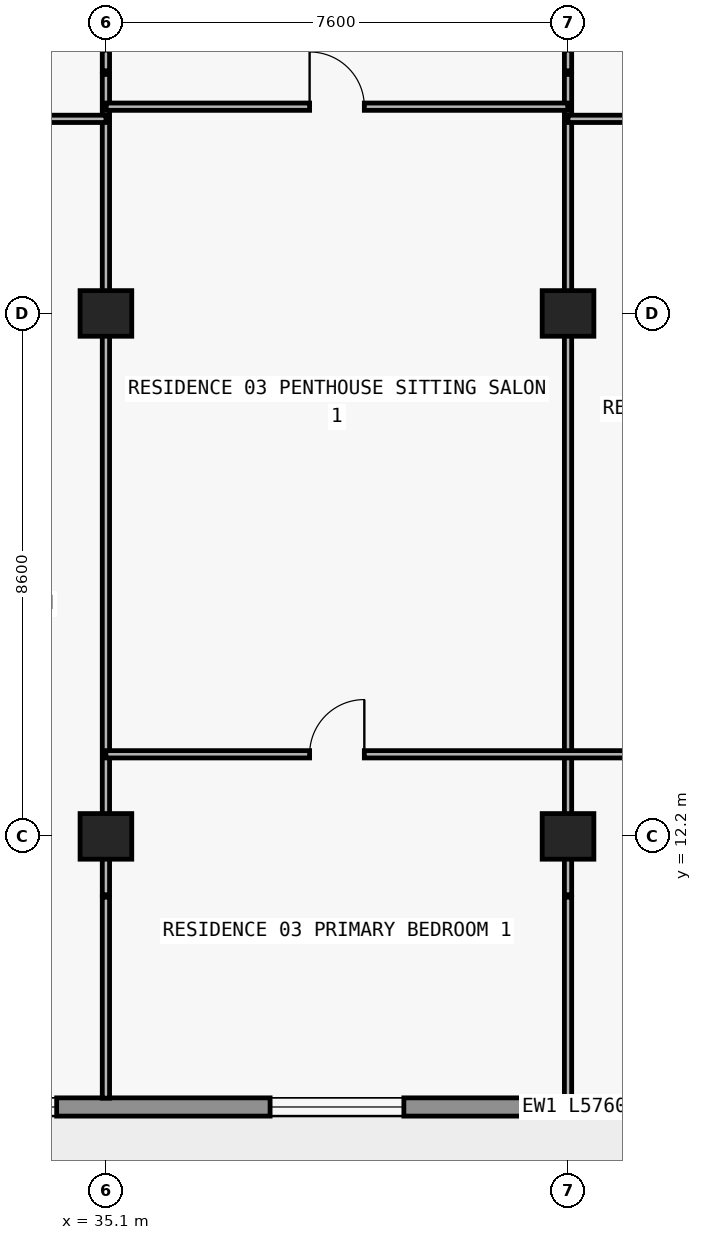
"""IFC4 building model, lengths in metres.
Left out: names, types, materials, properties, quantities, classifications, styles, units other than length and angle.
Written with IfcOpenShell. Run it as: python <this file> out.ifc"""

import sys

from ifc_helpers import new_model, si_unit, direction, frame, frame_2d, origin, origin_2d, place, context, subcontext, project, spatial, rectangle, extrude, element, fill, save


model = new_model("IFC4")
c1 = context("Model", 3, precision=1e-05, world=origin(), true_north=direction((0.0, 1.0)))
c2 = subcontext(c1, "Body", "Model", "MODEL_VIEW")
j1 = project(units=[si_unit("LENGTHUNIT", "METRE"), si_unit("PLANEANGLEUNIT", "RADIAN")], contexts=[c1])
p1 = place(None, origin())
s1 = spatial("IfcSite", under=j1, at=p1, CompositionType="ELEMENT")
p2 = place(p1, origin())
s2 = spatial("IfcBuilding", under=s1, at=p2, CompositionType="ELEMENT")
p3 = place(p2, frame((0.0, 0.0, 177.0)))
s3 = spatial("IfcBuildingStorey", under=s2, at=p3, CompositionType="ELEMENT", Elevation=177.0)
for number, where, z_axis, x_axis in (
    (1, (35.1, 12.2, 0.0), (0.0, 0.0, 1.0), (1.0, 0.0, 0.0)),
    (2, (42.7, 12.2, 0.0), (0.0, 0.0, 1.0), (1.0, 0.0, 0.0)),
    (3, (35.1, 20.8, 0.0), (0.0, 0.0, 1.0), (1.0, 0.0, 0.0)),
    (4, (42.7, 20.8, 0.0), (0.0, 0.0, 1.0), (1.0, 0.0, 0.0)),
):
    element("IfcColumn", number, at=place(p3, frame(where, z_axis=z_axis, x_axis=x_axis)), inside=s3, PredefinedType="COLUMN", context=c2, shape_type="SweptSolid", body=[
        extrude(rectangle(XDim=0.85, YDim=0.75, at=origin_2d()), origin(), (0.0, 0.0, 1.0), 3.05),
    ])
p4 = place(p3, frame((67.7, 7.75, 0.0), z_axis=(0.0, 0.0, 1.0), x_axis=(-1.0, 0.0, 0.0)))
e5 = element("IfcWall", 5, at=p4, inside=s3, PredefinedType="STANDARD", context=c2, shape_type="SweptSolid", body=[
    extrude(rectangle(XDim=57.6, YDim=0.3, at=frame_2d((28.8, 0.0))), origin(), (0.0, 0.0, 1.0), 3.05),
])
p5 = place(p4, frame((54.673, 0.0, 0.0)))
e6 = element("IfcOpeningElement", 6, at=p5, cuts=e5, PredefinedType="OPENING", context=c2, shape_type="SweptSolid", body=[
    extrude(rectangle(XDim=2.0, YDim=2.3, at=frame_2d((1.0, 1.15))), frame((0.0, 0.16, 0.0), z_axis=(0.0, -1.0, 0.0), x_axis=(1.0, 0.0, 0.0)), (0.0, 0.0, 1.0), 0.32),
])
p6 = place(p4, frame((50.473, 0.0, 0.85)))
e7 = element("IfcOpeningElement", 7, at=p6, cuts=e5, PredefinedType="OPENING", context=c2, shape_type="SweptSolid", body=[
    extrude(rectangle(XDim=2.2, YDim=1.55, at=frame_2d((1.1, 0.775))), frame((0.0, 0.16, 0.0), z_axis=(0.0, -1.0, 0.0), x_axis=(1.0, 0.0, 0.0)), (0.0, 0.0, 1.0), 0.32),
])
p7 = place(p4, frame((46.09, 0.0, 0.0)))
e8 = element("IfcOpeningElement", 8, at=p7, cuts=e5, PredefinedType="OPENING", context=c2, shape_type="SweptSolid", body=[
    extrude(rectangle(XDim=2.0, YDim=2.3, at=frame_2d((1.0, 1.15))), frame((0.0, 0.16, 0.0), z_axis=(0.0, -1.0, 0.0), x_axis=(1.0, 0.0, 0.0)), (0.0, 0.0, 1.0), 0.32),
])
p8 = place(p4, frame((41.99, 0.0, 0.85)))
e9 = element("IfcOpeningElement", 9, at=p8, cuts=e5, PredefinedType="OPENING", context=c2, shape_type="SweptSolid", body=[
    extrude(rectangle(XDim=1.8, YDim=1.55, at=frame_2d((0.9, 0.775))), frame((0.0, 0.16, 0.0), z_axis=(0.0, -1.0, 0.0), x_axis=(1.0, 0.0, 0.0)), (0.0, 0.0, 1.0), 0.32),
])
p9 = place(p4, frame((38.09, 0.0, 0.0)))
e10 = element("IfcOpeningElement", 10, at=p9, cuts=e5, PredefinedType="OPENING", context=c2, shape_type="SweptSolid", body=[
    extrude(rectangle(XDim=2.0, YDim=2.3, at=frame_2d((1.0, 1.15))), frame((0.0, 0.16, 0.0), z_axis=(0.0, -1.0, 0.0), x_axis=(1.0, 0.0, 0.0)), (0.0, 0.0, 1.0), 0.32),
])
p10 = place(p4, frame((33.41, 0.0, 0.65)))
e11 = element("IfcOpeningElement", 11, at=p10, cuts=e5, PredefinedType="OPENING", context=c2, shape_type="SweptSolid", body=[
    extrude(rectangle(XDim=2.6, YDim=1.85, at=frame_2d((1.3, 0.925))), frame((0.0, 0.16, 0.0), z_axis=(0.0, -1.0, 0.0), x_axis=(1.0, 0.0, 0.0)), (0.0, 0.0, 1.0), 0.32),
])
p11 = place(p4, frame((27.7, 0.0, 0.85)))
e12 = element("IfcOpeningElement", 12, at=p11, cuts=e5, PredefinedType="OPENING", context=c2, shape_type="SweptSolid", body=[
    extrude(rectangle(XDim=2.2, YDim=1.55, at=frame_2d((1.1, 0.775))), frame((0.0, 0.16, 0.0), z_axis=(0.0, -1.0, 0.0), x_axis=(1.0, 0.0, 0.0)), (0.0, 0.0, 1.0), 0.32),
])
p12 = place(p4, frame((19.7, 0.0, 0.85)))
e13 = element("IfcOpeningElement", 13, at=p12, cuts=e5, PredefinedType="OPENING", context=c2, shape_type="SweptSolid", body=[
    extrude(rectangle(XDim=2.2, YDim=1.55, at=frame_2d((1.1, 0.775))), frame((0.0, 0.16, 0.0), z_axis=(0.0, -1.0, 0.0), x_axis=(1.0, 0.0, 0.0)), (0.0, 0.0, 1.0), 0.32),
])
p13 = place(p4, frame((13.29, 0.0, 0.0)))
e14 = element("IfcOpeningElement", 14, at=p13, cuts=e5, PredefinedType="OPENING", context=c2, shape_type="SweptSolid", body=[
    extrude(rectangle(XDim=2.0, YDim=2.3, at=frame_2d((1.0, 1.15))), frame((0.0, 0.16, 0.0), z_axis=(0.0, -1.0, 0.0), x_axis=(1.0, 0.0, 0.0)), (0.0, 0.0, 1.0), 0.32),
])
p14 = place(p4, frame((9.19, 0.0, 0.85)))
e15 = element("IfcOpeningElement", 15, at=p14, cuts=e5, PredefinedType="OPENING", context=c2, shape_type="SweptSolid", body=[
    extrude(rectangle(XDim=1.8, YDim=1.55, at=frame_2d((0.9, 0.775))), frame((0.0, 0.16, 0.0), z_axis=(0.0, -1.0, 0.0), x_axis=(1.0, 0.0, 0.0)), (0.0, 0.0, 1.0), 0.32),
])
p15 = place(p4, frame((5.273, 0.0, 0.0)))
e16 = element("IfcOpeningElement", 16, at=p15, cuts=e5, PredefinedType="OPENING", context=c2, shape_type="SweptSolid", body=[
    extrude(rectangle(XDim=2.0, YDim=2.3, at=frame_2d((1.0, 1.15))), frame((0.0, 0.16, 0.0), z_axis=(0.0, -1.0, 0.0), x_axis=(1.0, 0.0, 0.0)), (0.0, 0.0, 1.0), 0.32),
])
p16 = place(p4, frame((1.073, 0.0, 0.85)))
e17 = element("IfcOpeningElement", 17, at=p16, cuts=e5, PredefinedType="OPENING", context=c2, shape_type="SweptSolid", body=[
    extrude(rectangle(XDim=2.2, YDim=1.55, at=frame_2d((1.1, 0.775))), frame((0.0, 0.16, 0.0), z_axis=(0.0, -1.0, 0.0), x_axis=(1.0, 0.0, 0.0)), (0.0, 0.0, 1.0), 0.32),
])
p17 = place(p3, frame((35.1, 7.895, 0.0), z_axis=(0.0, 0.0, 1.0), x_axis=(0.0, 1.0, 0.0)))
e18 = element("IfcWall", 18, at=p17, inside=s3, PredefinedType="PARTITIONING", context=c2, shape_type="SweptSolid", body=[
    extrude(rectangle(XDim=3.305, YDim=0.12, at=frame_2d((1.652, 0.0))), origin(), (0.0, 0.0, 1.0), 3.05),
])
p18 = place(p3, frame((35.1, 11.24, 0.0), z_axis=(0.0, 0.0, 1.0), x_axis=(0.0, 1.0, 0.0)))
e19 = element("IfcWall", 19, at=p18, inside=s3, PredefinedType="PARTITIONING", context=c2, shape_type="SweptSolid", body=[
    extrude(rectangle(XDim=13.49, YDim=0.12, at=frame_2d((6.745, 0.0))), origin(), (0.0, 0.0, 1.0), 2.263),
])
p19 = place(p3, frame((35.1, 24.79, 0.0), z_axis=(0.0, 0.0, 1.0), x_axis=(0.0, 1.0, 0.0)))
e20 = element("IfcWall", 20, at=p19, inside=s3, PredefinedType="PARTITIONING", context=c2, shape_type="SweptSolid", body=[
    extrude(rectangle(XDim=0.34, YDim=0.12, at=frame_2d((0.17, 0.0))), origin(), (0.0, 0.0, 1.0), 2.263),
])
p20 = place(p3, frame((42.7, 7.895, 0.0), z_axis=(0.0, 0.0, 1.0), x_axis=(0.0, 1.0, 0.0)))
e21 = element("IfcWall", 21, at=p20, inside=s3, PredefinedType="PARTITIONING", context=c2, shape_type="SweptSolid", body=[
    extrude(rectangle(XDim=3.305, YDim=0.12, at=frame_2d((1.652, 0.0))), origin(), (0.0, 0.0, 1.0), 3.05),
])
p21 = place(p3, frame((42.7, 11.24, 0.0), z_axis=(0.0, 0.0, 1.0), x_axis=(0.0, 1.0, 0.0)))
e22 = element("IfcWall", 22, at=p21, inside=s3, PredefinedType="PARTITIONING", context=c2, shape_type="SweptSolid", body=[
    extrude(rectangle(XDim=13.49, YDim=0.12, at=frame_2d((6.745, 0.0))), origin(), (0.0, 0.0, 1.0), 2.263),
])
p22 = place(p3, frame((42.7, 24.79, 0.0), z_axis=(0.0, 0.0, 1.0), x_axis=(0.0, 1.0, 0.0)))
e23 = element("IfcWall", 23, at=p22, inside=s3, PredefinedType="PARTITIONING", context=c2, shape_type="SweptSolid", body=[
    extrude(rectangle(XDim=0.34, YDim=0.12, at=frame_2d((0.17, 0.0))), origin(), (0.0, 0.0, 1.0), 2.263),
])
p23 = place(p3, frame((35.1, 13.55, 0.0), z_axis=(0.0, 0.0, 1.0), x_axis=(1.0, 0.0, 0.0)))
e24 = element("IfcWall", 24, at=p23, inside=s3, PredefinedType="PARTITIONING", context=c2, shape_type="SweptSolid", body=[
    extrude(rectangle(XDim=16.0, YDim=0.12, at=frame_2d((8.0, 0.0))), origin(), (0.0, 0.0, 1.0), 3.05),
])
p24 = place(p23, frame((3.35, 0.0, 0.0)))
e25 = element("IfcOpeningElement", 25, at=p24, cuts=e24, PredefinedType="OPENING", context=c2, shape_type="SweptSolid", body=[
    extrude(rectangle(XDim=0.9, YDim=2.15, at=frame_2d((0.45, 1.075))), frame((0.0, 0.07, 0.0), z_axis=(0.0, -1.0, 0.0), x_axis=(1.0, 0.0, 0.0)), (0.0, 0.0, 1.0), 0.14),
])
p25 = place(p23, frame((11.35, 0.0, 0.0)))
e26 = element("IfcOpeningElement", 26, at=p25, cuts=e24, PredefinedType="OPENING", context=c2, shape_type="SweptSolid", body=[
    extrude(rectangle(XDim=0.9, YDim=2.15, at=frame_2d((0.45, 1.075))), frame((0.0, 0.07, 0.0), z_axis=(0.0, -1.0, 0.0), x_axis=(1.0, 0.0, 0.0)), (0.0, 0.0, 1.0), 0.14),
])
p26 = place(p3, frame((26.92, 24.0, 0.0), z_axis=(0.0, 0.0, 1.0), x_axis=(1.0, 0.0, 0.0)))
e27 = element("IfcWall", 27, at=p26, inside=s3, PredefinedType="PARTITIONING", context=c2, shape_type="SweptSolid", body=[
    extrude(rectangle(XDim=8.18, YDim=0.12, at=frame_2d((4.09, 0.0))), origin(), (0.0, 0.0, 1.0), 3.05),
])
p27 = place(p26, frame((1.33, 0.0, 0.0)))
e28 = element("IfcOpeningElement", 28, at=p27, cuts=e27, PredefinedType="OPENING", context=c2, shape_type="SweptSolid", body=[
    extrude(rectangle(XDim=0.9, YDim=2.15, at=frame_2d((0.45, 1.075))), frame((0.0, 0.07, 0.0), z_axis=(0.0, -1.0, 0.0), x_axis=(1.0, 0.0, 0.0)), (0.0, 0.0, 1.0), 0.14),
])
p28 = place(p3, frame((42.7, 24.0, 0.0), z_axis=(0.0, 0.0, 1.0), x_axis=(1.0, 0.0, 0.0)))
e29 = element("IfcWall", 29, at=p28, inside=s3, PredefinedType="PARTITIONING", context=c2, shape_type="SweptSolid", body=[
    extrude(rectangle(XDim=8.18, YDim=0.12, at=frame_2d((4.09, 0.0))), origin(), (0.0, 0.0, 1.0), 3.05),
])
p29 = place(p28, frame((3.64, 0.0, 0.0)))
e30 = element("IfcOpeningElement", 30, at=p29, cuts=e29, PredefinedType="OPENING", context=c2, shape_type="SweptSolid", body=[
    extrude(rectangle(XDim=0.9, YDim=2.15, at=frame_2d((0.45, 1.075))), frame((0.0, 0.07, 0.0), z_axis=(0.0, -1.0, 0.0), x_axis=(1.0, 0.0, 0.0)), (0.0, 0.0, 1.0), 0.14),
])
p30 = place(p3, frame((35.105, 24.2, 0.0), z_axis=(0.0, 0.0, 1.0), x_axis=(1.0, 0.0, 0.0)))
e31 = element("IfcWall", 31, at=p30, inside=s3, PredefinedType="PARTITIONING", context=c2, shape_type="SweptSolid", body=[
    extrude(rectangle(XDim=7.59, YDim=0.12, at=frame_2d((3.795, 0.0))), origin(), (0.0, 0.0, 1.0), 3.05),
])
p31 = place(p30, frame((3.345, 0.0, 0.0)))
e32 = element("IfcOpeningElement", 32, at=p31, cuts=e31, PredefinedType="OPENING", context=c2, shape_type="SweptSolid", body=[
    extrude(rectangle(XDim=0.9, YDim=2.15, at=frame_2d((0.45, 1.075))), frame((0.0, 0.07, 0.0), z_axis=(0.0, -1.0, 0.0), x_axis=(1.0, 0.0, 0.0)), (0.0, 0.0, 1.0), 0.14),
])
p32 = place(p10, origin())
e33 = element("IfcWindow", 33, at=p32, inside=s3, PartitioningType="SINGLE_PANEL", PredefinedType="WINDOW", context=c2, shape_type="SweptSolid", body=[
    extrude(rectangle(XDim=2.6, YDim=1.85, at=frame_2d((1.3, 0.925))), frame((0.0, 0.03, 0.0), z_axis=(0.0, -1.0, 0.0), x_axis=(1.0, 0.0, 0.0)), (0.0, 0.0, 1.0), 0.06),
])
fill(e11, e33)
p33 = place(p11, origin())
e34 = element("IfcWindow", 34, at=p33, inside=s3, PartitioningType="SINGLE_PANEL", PredefinedType="WINDOW", context=c2, shape_type="SweptSolid", body=[
    extrude(rectangle(XDim=2.2, YDim=1.55, at=frame_2d((1.1, 0.775))), frame((0.0, 0.03, 0.0), z_axis=(0.0, -1.0, 0.0), x_axis=(1.0, 0.0, 0.0)), (0.0, 0.0, 1.0), 0.06),
])
fill(e12, e34)
p34 = place(p31, origin())
e35 = element("IfcDoor", 35, at=p34, inside=s3, OperationType="SINGLE_SWING_LEFT", PredefinedType="DOOR", context=c2, shape_type="SweptSolid", body=[
    extrude(rectangle(XDim=0.9, YDim=2.15, at=frame_2d((0.45, 1.075))), frame((0.0, 0.025, 0.0), z_axis=(0.0, -1.0, 0.0), x_axis=(1.0, 0.0, 0.0)), (0.0, 0.0, 1.0), 0.05),
])
fill(e32, e35)
p35 = place(p24, origin())
e36 = element("IfcDoor", 36, at=p35, inside=s3, OperationType="SINGLE_SWING_RIGHT", PredefinedType="DOOR", context=c2, shape_type="SweptSolid", body=[
    extrude(rectangle(XDim=0.9, YDim=2.15, at=frame_2d((0.45, 1.075))), frame((0.0, 0.025, 0.0), z_axis=(0.0, -1.0, 0.0), x_axis=(1.0, 0.0, 0.0)), (0.0, 0.0, 1.0), 0.05),
])
fill(e25, e36)
save(model, sys.argv[1])
